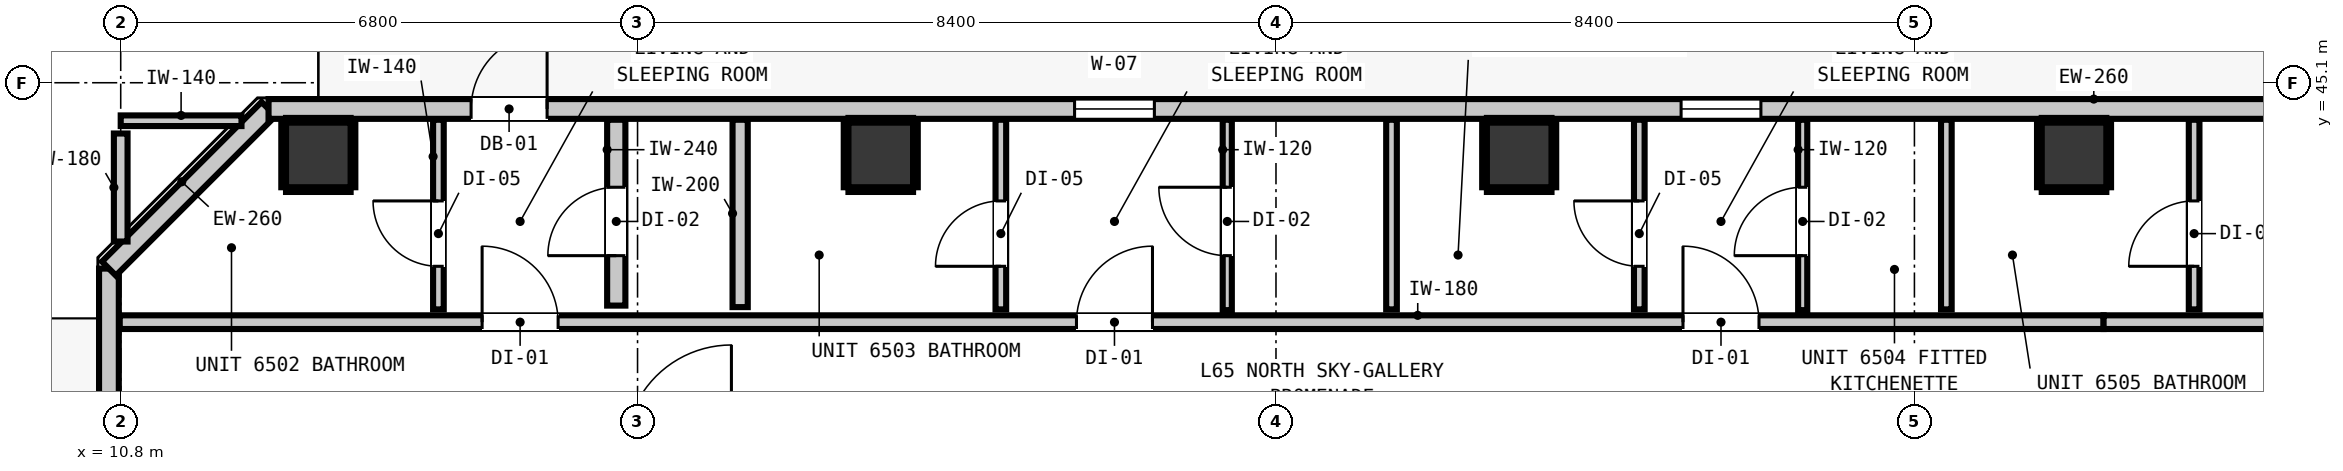
"""IFC4 building model, lengths in metres.
Left out: names, types, materials, properties, quantities, classifications, styles, units other than length and angle.
Written with IfcOpenShell. Run it as: python <this file> out.ifc"""

import sys

from ifc_helpers import new_model, si_unit, direction, frame, frame_2d, origin, origin_2d, place, context, subcontext, project, spatial, rectangle, extrude, element, fill, save


model = new_model("IFC4")
c1 = context("Model", 3, precision=1e-05, world=origin(), true_north=direction((0.0, 1.0)))
c2 = subcontext(c1, "Body", "Model", "MODEL_VIEW")
j1 = project(units=[si_unit("LENGTHUNIT", "METRE"), si_unit("PLANEANGLEUNIT", "RADIAN")], contexts=[c1])
p1 = place(None, origin())
s1 = spatial("IfcSite", under=j1, at=p1, CompositionType="ELEMENT")
p2 = place(p1, origin())
s2 = spatial("IfcBuilding", under=s1, at=p2, CompositionType="ELEMENT")
p3 = place(p2, frame((0.0, 0.0, 223.36)))
s3 = spatial("IfcBuildingStorey", under=s2, at=p3, CompositionType="ELEMENT", Elevation=223.36)
for number, where, z_axis, x_axis in (
    (1, (13.4, 44.15, 0.0), (0.0, 0.0, 1.0), (1.0, 0.0, 0.0)),
    (2, (20.8, 44.15, 0.0), (0.0, 0.0, 1.0), (1.0, 0.0, 0.0)),
    (3, (29.2, 44.15, 0.0), (0.0, 0.0, 1.0), (1.0, 0.0, 0.0)),
    (4, (36.5, 44.15, 0.0), (0.0, 0.0, 1.0), (1.0, 0.0, 0.0)),
):
    element("IfcColumn", number, at=place(p3, frame(where, z_axis=z_axis, x_axis=x_axis)), inside=s3, PredefinedType="COLUMN", context=c2, shape_type="SweptSolid", body=[
        extrude(rectangle(XDim=0.85, YDim=0.85, at=origin_2d()), origin(), (0.0, 0.0, 1.0), 3.32),
    ])
p4 = place(p3, frame((10.645, 12.345, 0.0), z_axis=(0.0, 0.0, 1.0), x_axis=(0.0, 1.0, 0.0)))
e5 = element("IfcWall", 5, at=p4, inside=s3, PredefinedType="STANDARD", context=c2, shape_type="SweptSolid", body=[
    extrude(rectangle(XDim=30.31, YDim=0.26, at=frame_2d((15.155, 0.0))), origin(), (0.0, 0.0, 1.0), 2.92),
])
p5 = place(p4, frame((0.91, 0.0, 0.0)))
e6 = element("IfcOpeningElement", 6, at=p5, cuts=e5, PredefinedType="OPENING", context=c2, shape_type="SweptSolid", body=[
    extrude(rectangle(XDim=1.0, YDim=2.15, at=frame_2d((0.5, 1.075))), frame((0.0, 0.14, 0.0), z_axis=(0.0, -1.0, 0.0), x_axis=(1.0, 0.0, 0.0)), (0.0, 0.0, 1.0), 0.28),
])
p6 = place(p4, frame((2.322, 0.0, 0.85)))
e7 = element("IfcOpeningElement", 7, at=p6, cuts=e5, PredefinedType="OPENING", context=c2, shape_type="SweptSolid", body=[
    extrude(rectangle(XDim=0.58, YDim=1.5, at=frame_2d((0.29, 0.75))), frame((0.0, 0.14, 0.0), z_axis=(0.0, -1.0, 0.0), x_axis=(1.0, 0.0, 0.0)), (0.0, 0.0, 1.0), 0.28),
])
p7 = place(p3, frame((10.645, 42.655, 0.0), z_axis=(0.0, 0.0, 1.0), x_axis=(0.707147883682, 0.707065676302, 0.0)))
e8 = element("IfcWall", 8, at=p7, inside=s3, PredefinedType="STANDARD", context=c2, shape_type="SweptSolid", body=[
    extrude(rectangle(XDim=2.97, YDim=0.26, at=frame_2d((1.485, 0.0))), origin(), (0.0, 0.0, 1.0), 2.92),
])
p8 = place(p3, frame((12.745, 44.755, 0.0), z_axis=(0.0, 0.0, 1.0), x_axis=(1.0, 0.0, 0.0)))
e9 = element("IfcWall", 9, at=p8, inside=s3, PredefinedType="STANDARD", context=c2, shape_type="SweptSolid", body=[
    extrude(rectangle(XDim=32.71, YDim=0.26, at=frame_2d((16.355, 0.0))), origin(), (0.0, 0.0, 1.0), 2.92),
])
p9 = place(p8, frame((2.665, 0.0, 0.0)))
e10 = element("IfcOpeningElement", 10, at=p9, cuts=e9, PredefinedType="OPENING", context=c2, shape_type="SweptSolid", body=[
    extrude(rectangle(XDim=1.0, YDim=2.15, at=frame_2d((0.5, 1.075))), frame((0.0, 0.14, 0.0), z_axis=(0.0, -1.0, 0.0), x_axis=(1.0, 0.0, 0.0)), (0.0, 0.0, 1.0), 0.28),
])
p10 = place(p8, frame((10.605, 0.0, 0.85)))
e11 = element("IfcOpeningElement", 11, at=p10, cuts=e9, PredefinedType="OPENING", context=c2, shape_type="SweptSolid", body=[
    extrude(rectangle(XDim=1.05, YDim=1.65, at=frame_2d((0.525, 0.825))), frame((0.0, 0.14, 0.0), z_axis=(0.0, -1.0, 0.0), x_axis=(1.0, 0.0, 0.0)), (0.0, 0.0, 1.0), 0.28),
])
p11 = place(p8, frame((18.585, 0.0, 0.85)))
e12 = element("IfcOpeningElement", 12, at=p11, cuts=e9, PredefinedType="OPENING", context=c2, shape_type="SweptSolid", body=[
    extrude(rectangle(XDim=1.05, YDim=1.65, at=frame_2d((0.525, 0.825))), frame((0.0, 0.14, 0.0), z_axis=(0.0, -1.0, 0.0), x_axis=(1.0, 0.0, 0.0)), (0.0, 0.0, 1.0), 0.28),
])
p12 = place(p8, frame((28.395, 0.0, 0.85)))
e13 = element("IfcOpeningElement", 13, at=p12, cuts=e9, PredefinedType="OPENING", context=c2, shape_type="SweptSolid", body=[
    extrude(rectangle(XDim=1.05, YDim=1.65, at=frame_2d((0.525, 0.825))), frame((0.0, 0.14, 0.0), z_axis=(0.0, -1.0, 0.0), x_axis=(1.0, 0.0, 0.0)), (0.0, 0.0, 1.0), 0.28),
])
p13 = place(p3, frame((10.787, 41.95, 0.0), z_axis=(0.0, 0.0, 1.0), x_axis=(1.0, 0.0, 0.0)))
e14 = element("IfcWall", 14, at=p13, inside=s3, PredefinedType="PARTITIONING", context=c2, shape_type="SweptSolid", body=[
    extrude(rectangle(XDim=26.102, YDim=0.18, at=frame_2d((13.051, 0.0))), origin(), (0.0, 0.0, 1.0), 2.92),
])
p14 = place(p13, frame((4.768, 0.0, 0.0)))
e15 = element("IfcOpeningElement", 15, at=p14, cuts=e14, PredefinedType="OPENING", context=c2, shape_type="SweptSolid", body=[
    extrude(rectangle(XDim=1.0, YDim=2.15, at=frame_2d((0.5, 1.075))), frame((0.0, 0.1, 0.0), z_axis=(0.0, -1.0, 0.0), x_axis=(1.0, 0.0, 0.0)), (0.0, 0.0, 1.0), 0.2),
])
p15 = place(p13, frame((12.588, 0.0, 0.0)))
e16 = element("IfcOpeningElement", 16, at=p15, cuts=e14, PredefinedType="OPENING", context=c2, shape_type="SweptSolid", body=[
    extrude(rectangle(XDim=1.0, YDim=2.15, at=frame_2d((0.5, 1.075))), frame((0.0, 0.1, 0.0), z_axis=(0.0, -1.0, 0.0), x_axis=(1.0, 0.0, 0.0)), (0.0, 0.0, 1.0), 0.2),
])
p16 = place(p13, frame((20.568, 0.0, 0.0)))
e17 = element("IfcOpeningElement", 17, at=p16, cuts=e14, PredefinedType="OPENING", context=c2, shape_type="SweptSolid", body=[
    extrude(rectangle(XDim=1.0, YDim=2.15, at=frame_2d((0.5, 1.075))), frame((0.0, 0.1, 0.0), z_axis=(0.0, -1.0, 0.0), x_axis=(1.0, 0.0, 0.0)), (0.0, 0.0, 1.0), 0.2),
])
p17 = place(p3, frame((36.889, 41.95, 0.0), z_axis=(0.0, 0.0, 1.0), x_axis=(1.0, 0.0, 0.0)))
e18 = element("IfcWall", 18, at=p17, inside=s3, PredefinedType="PARTITIONING", context=c2, shape_type="SweptSolid", body=[
    extrude(rectangle(XDim=9.722, YDim=0.18, at=frame_2d((4.861, 0.0))), origin(), (0.0, 0.0, 1.0), 2.297),
])
p18 = place(p17, frame((4.276, 0.0, 0.0)))
e19 = element("IfcOpeningElement", 19, at=p18, cuts=e18, PredefinedType="OPENING", context=c2, shape_type="SweptSolid", body=[
    extrude(rectangle(XDim=1.0, YDim=2.15, at=frame_2d((0.5, 1.075))), frame((0.0, 0.1, 0.0), z_axis=(0.0, -1.0, 0.0), x_axis=(1.0, 0.0, 0.0)), (0.0, 0.0, 1.0), 0.2),
])
p19 = place(p3, frame((10.8, 44.6, 0.0), z_axis=(0.0, 0.0, 1.0), x_axis=(1.0, 0.0, 0.0)))
e20 = element("IfcWall", 20, at=p19, inside=s3, PredefinedType="PARTITIONING", context=c2, shape_type="SweptSolid", body=[
    extrude(rectangle(XDim=1.589, YDim=0.14, at=frame_2d((0.794, 0.0))), origin(), (0.0, 0.0, 1.0), 2.92),
])
p20 = place(p3, frame((17.32, 42.168, 0.0), z_axis=(0.0, 0.0, 1.0), x_axis=(0.0, 1.0, 0.0)))
e21 = element("IfcWall", 21, at=p20, inside=s3, PredefinedType="PARTITIONING", context=c2, shape_type="SweptSolid", body=[
    extrude(rectangle(XDim=2.445, YDim=0.24, at=frame_2d((1.223, 0.0))), origin(), (0.0, 0.0, 1.0), 2.92),
])
p21 = place(p20, frame((0.657, 0.0, 0.0)))
e22 = element("IfcOpeningElement", 22, at=p21, cuts=e21, PredefinedType="OPENING", context=c2, shape_type="SweptSolid", body=[
    extrude(rectangle(XDim=0.9, YDim=2.1, at=frame_2d((0.45, 1.05))), frame((0.0, 0.13, 0.0), z_axis=(0.0, -1.0, 0.0), x_axis=(1.0, 0.0, 0.0)), (0.0, 0.0, 1.0), 0.26),
])
p22 = place(p3, frame((18.95, 42.148, 0.0), z_axis=(0.0, 0.0, 1.0), x_axis=(0.0, 1.0, 0.0)))
e23 = element("IfcWall", 23, at=p22, inside=s3, PredefinedType="PARTITIONING", context=c2, shape_type="SweptSolid", body=[
    extrude(rectangle(XDim=2.465, YDim=0.2, at=frame_2d((1.232, 0.0))), origin(), (0.0, 0.0, 1.0), 2.92),
])
p23 = place(p3, frame((10.8, 43.011, 0.0), z_axis=(0.0, 0.0, 1.0), x_axis=(0.0, 1.0, 0.0)))
e24 = element("IfcWall", 24, at=p23, inside=s3, PredefinedType="PARTITIONING", context=c2, shape_type="SweptSolid", body=[
    extrude(rectangle(XDim=1.421, YDim=0.18, at=frame_2d((0.71, 0.0))), origin(), (0.0, 0.0, 1.0), 2.92),
])
p24 = place(p3, frame((14.98, 42.118, 0.0), z_axis=(0.0, 0.0, 1.0), x_axis=(0.0, 1.0, 0.0)))
e25 = element("IfcWall", 25, at=p24, inside=s3, PredefinedType="PARTITIONING", context=c2, shape_type="SweptSolid", body=[
    extrude(rectangle(XDim=2.495, YDim=0.14, at=frame_2d((1.248, 0.0))), origin(), (0.0, 0.0, 1.0), 2.92),
])
p25 = place(p24, frame((0.567, 0.0, 0.0)))
e26 = element("IfcOpeningElement", 26, at=p25, cuts=e25, PredefinedType="OPENING", context=c2, shape_type="SweptSolid", body=[
    extrude(rectangle(XDim=0.86, YDim=2.02, at=frame_2d((0.43, 1.01))), frame((0.0, 0.08, 0.0), z_axis=(0.0, -1.0, 0.0), x_axis=(1.0, 0.0, 0.0)), (0.0, 0.0, 1.0), 0.16),
])
p26 = place(p3, frame((22.38, 42.118, 0.0), z_axis=(0.0, 0.0, 1.0), x_axis=(0.0, 1.0, 0.0)))
e27 = element("IfcWall", 27, at=p26, inside=s3, PredefinedType="PARTITIONING", context=c2, shape_type="SweptSolid", body=[
    extrude(rectangle(XDim=2.495, YDim=0.14, at=frame_2d((1.248, 0.0))), origin(), (0.0, 0.0, 1.0), 2.92),
])
p27 = place(p26, frame((0.567, 0.0, 0.0)))
e28 = element("IfcOpeningElement", 28, at=p27, cuts=e27, PredefinedType="OPENING", context=c2, shape_type="SweptSolid", body=[
    extrude(rectangle(XDim=0.86, YDim=2.02, at=frame_2d((0.43, 1.01))), frame((0.0, 0.08, 0.0), z_axis=(0.0, -1.0, 0.0), x_axis=(1.0, 0.0, 0.0)), (0.0, 0.0, 1.0), 0.16),
])
p28 = place(p3, frame((27.52, 42.118, 0.0), z_axis=(0.0, 0.0, 1.0), x_axis=(0.0, 1.0, 0.0)))
e29 = element("IfcWall", 29, at=p28, inside=s3, PredefinedType="PARTITIONING", context=c2, shape_type="SweptSolid", body=[
    extrude(rectangle(XDim=2.495, YDim=0.14, at=frame_2d((1.248, 0.0))), origin(), (0.0, 0.0, 1.0), 2.92),
])
p29 = place(p3, frame((30.78, 42.118, 0.0), z_axis=(0.0, 0.0, 1.0), x_axis=(0.0, 1.0, 0.0)))
e30 = element("IfcWall", 30, at=p29, inside=s3, PredefinedType="PARTITIONING", context=c2, shape_type="SweptSolid", body=[
    extrude(rectangle(XDim=2.495, YDim=0.14, at=frame_2d((1.248, 0.0))), origin(), (0.0, 0.0, 1.0), 2.92),
])
p30 = place(p29, frame((0.567, 0.0, 0.0)))
e31 = element("IfcOpeningElement", 31, at=p30, cuts=e30, PredefinedType="OPENING", context=c2, shape_type="SweptSolid", body=[
    extrude(rectangle(XDim=0.86, YDim=2.02, at=frame_2d((0.43, 1.01))), frame((0.0, 0.08, 0.0), z_axis=(0.0, -1.0, 0.0), x_axis=(1.0, 0.0, 0.0)), (0.0, 0.0, 1.0), 0.16),
])
p31 = place(p3, frame((34.82, 42.118, 0.0), z_axis=(0.0, 0.0, 1.0), x_axis=(0.0, 1.0, 0.0)))
e32 = element("IfcWall", 32, at=p31, inside=s3, PredefinedType="PARTITIONING", context=c2, shape_type="SweptSolid", body=[
    extrude(rectangle(XDim=2.495, YDim=0.14, at=frame_2d((1.248, 0.0))), origin(), (0.0, 0.0, 1.0), 2.92),
])
p32 = place(p3, frame((38.08, 42.118, 0.0), z_axis=(0.0, 0.0, 1.0), x_axis=(0.0, 1.0, 0.0)))
e33 = element("IfcWall", 33, at=p32, inside=s3, PredefinedType="PARTITIONING", context=c2, shape_type="SweptSolid", body=[
    extrude(rectangle(XDim=2.495, YDim=0.14, at=frame_2d((1.248, 0.0))), origin(), (0.0, 0.0, 1.0), 2.92),
])
p33 = place(p32, frame((0.567, 0.0, 0.0)))
e34 = element("IfcOpeningElement", 34, at=p33, cuts=e33, PredefinedType="OPENING", context=c2, shape_type="SweptSolid", body=[
    extrude(rectangle(XDim=0.86, YDim=2.02, at=frame_2d((0.43, 1.01))), frame((0.0, 0.08, 0.0), z_axis=(0.0, -1.0, 0.0), x_axis=(1.0, 0.0, 0.0)), (0.0, 0.0, 1.0), 0.16),
])
p34 = place(p3, frame((25.359, 42.108, 0.0), z_axis=(0.0, 0.0, 1.0), x_axis=(0.0, 1.0, 0.0)))
e35 = element("IfcWall", 35, at=p34, inside=s3, PredefinedType="PARTITIONING", context=c2, shape_type="SweptSolid", body=[
    extrude(rectangle(XDim=2.505, YDim=0.12, at=frame_2d((1.252, 0.0))), origin(), (0.0, 0.0, 1.0), 2.92),
])
p35 = place(p34, frame((0.717, 0.0, 0.0)))
e36 = element("IfcOpeningElement", 36, at=p35, cuts=e35, PredefinedType="OPENING", context=c2, shape_type="SweptSolid", body=[
    extrude(rectangle(XDim=0.9, YDim=2.1, at=frame_2d((0.45, 1.05))), frame((0.0, 0.07, 0.0), z_axis=(0.0, -1.0, 0.0), x_axis=(1.0, 0.0, 0.0)), (0.0, 0.0, 1.0), 0.14),
])
p36 = place(p3, frame((32.93, 42.108, 0.0), z_axis=(0.0, 0.0, 1.0), x_axis=(0.0, 1.0, 0.0)))
e37 = element("IfcWall", 37, at=p36, inside=s3, PredefinedType="PARTITIONING", context=c2, shape_type="SweptSolid", body=[
    extrude(rectangle(XDim=2.505, YDim=0.12, at=frame_2d((1.252, 0.0))), origin(), (0.0, 0.0, 1.0), 2.92),
])
p37 = place(p36, frame((0.717, 0.0, 0.0)))
e38 = element("IfcOpeningElement", 38, at=p37, cuts=e37, PredefinedType="OPENING", context=c2, shape_type="SweptSolid", body=[
    extrude(rectangle(XDim=0.9, YDim=2.1, at=frame_2d((0.45, 1.05))), frame((0.0, 0.07, 0.0), z_axis=(0.0, -1.0, 0.0), x_axis=(1.0, 0.0, 0.0)), (0.0, 0.0, 1.0), 0.14),
])
for number, where, z_axis, x_axis in (
    (39, (12.975, 43.693, 0.0), (0.0, 0.0, 1.0), (1.0, 0.0, 0.0)),
    (40, (12.975, 44.607, 0.0), (0.0, 0.0, 1.0), (1.0, 0.0, 0.0)),
    (41, (12.943, 43.725, 0.0), (0.0, 0.0, 1.0), (0.0, 1.0, 0.0)),
    (42, (13.857, 43.725, 0.0), (0.0, 0.0, 1.0), (0.0, 1.0, 0.0)),
):
    element("IfcWall", number, at=place(p3, frame(where, z_axis=z_axis, x_axis=x_axis)), inside=s3, PredefinedType="PARTITIONING", context=c2, shape_type="SweptSolid", body=[
        extrude(rectangle(XDim=0.85, YDim=0.06, at=frame_2d((0.425, 0.0))), origin(), (0.0, 0.0, 1.0), 1.45),
    ])
for number, where, z_axis, x_axis in (
    (43, (20.375, 43.693, 0.0), (0.0, 0.0, 1.0), (1.0, 0.0, 0.0)),
    (44, (20.375, 44.607, 0.0), (0.0, 0.0, 1.0), (1.0, 0.0, 0.0)),
):
    element("IfcWall", number, at=place(p3, frame(where, z_axis=z_axis, x_axis=x_axis)), inside=s3, PredefinedType="PARTITIONING", context=c2, shape_type="SweptSolid", body=[
        extrude(rectangle(XDim=0.85, YDim=0.06, at=frame_2d((0.425, 0.0))), origin(), (0.0, 0.0, 1.0), 1.45),
    ])
for number, where, z_axis, x_axis in (
    (45, (20.343, 43.725, 0.0), (0.0, 0.0, 1.0), (0.0, 1.0, 0.0)),
    (46, (21.257, 43.725, 0.0), (0.0, 0.0, 1.0), (0.0, 1.0, 0.0)),
):
    element("IfcWall", number, at=place(p3, frame(where, z_axis=z_axis, x_axis=x_axis)), inside=s3, PredefinedType="PARTITIONING", context=c2, shape_type="SweptSolid", body=[
        extrude(rectangle(XDim=0.85, YDim=0.06, at=frame_2d((0.425, 0.0))), origin(), (0.0, 0.0, 1.0), 1.45),
    ])
for number, where, z_axis, x_axis in (
    (47, (28.775, 43.693, 0.0), (0.0, 0.0, 1.0), (1.0, 0.0, 0.0)),
    (48, (28.775, 44.607, 0.0), (0.0, 0.0, 1.0), (1.0, 0.0, 0.0)),
):
    element("IfcWall", number, at=place(p3, frame(where, z_axis=z_axis, x_axis=x_axis)), inside=s3, PredefinedType="PARTITIONING", context=c2, shape_type="SweptSolid", body=[
        extrude(rectangle(XDim=0.85, YDim=0.06, at=frame_2d((0.425, 0.0))), origin(), (0.0, 0.0, 1.0), 1.45),
    ])
for number, where, z_axis, x_axis in (
    (49, (28.743, 43.725, 0.0), (0.0, 0.0, 1.0), (0.0, 1.0, 0.0)),
    (50, (29.657, 43.725, 0.0), (0.0, 0.0, 1.0), (0.0, 1.0, 0.0)),
):
    element("IfcWall", number, at=place(p3, frame(where, z_axis=z_axis, x_axis=x_axis)), inside=s3, PredefinedType="PARTITIONING", context=c2, shape_type="SweptSolid", body=[
        extrude(rectangle(XDim=0.85, YDim=0.06, at=frame_2d((0.425, 0.0))), origin(), (0.0, 0.0, 1.0), 1.45),
    ])
for number, where, z_axis, x_axis in (
    (51, (36.075, 43.693, 0.0), (0.0, 0.0, 1.0), (1.0, 0.0, 0.0)),
    (52, (36.075, 44.607, 0.0), (0.0, 0.0, 1.0), (1.0, 0.0, 0.0)),
):
    element("IfcWall", number, at=place(p3, frame(where, z_axis=z_axis, x_axis=x_axis)), inside=s3, PredefinedType="PARTITIONING", context=c2, shape_type="SweptSolid", body=[
        extrude(rectangle(XDim=0.85, YDim=0.06, at=frame_2d((0.425, 0.0))), origin(), (0.0, 0.0, 1.0), 1.45),
    ])
for number, where, z_axis, x_axis in (
    (53, (36.043, 43.725, 0.0), (0.0, 0.0, 1.0), (0.0, 1.0, 0.0)),
    (54, (36.957, 43.725, 0.0), (0.0, 0.0, 1.0), (0.0, 1.0, 0.0)),
):
    element("IfcWall", number, at=place(p3, frame(where, z_axis=z_axis, x_axis=x_axis)), inside=s3, PredefinedType="PARTITIONING", context=c2, shape_type="SweptSolid", body=[
        extrude(rectangle(XDim=0.85, YDim=0.06, at=frame_2d((0.425, 0.0))), origin(), (0.0, 0.0, 1.0), 1.45),
    ])
p38 = place(p9, origin())
e55 = element("IfcDoor", 55, at=p38, inside=s3, OperationType="SINGLE_SWING_RIGHT", PredefinedType="DOOR", context=c2, shape_type="SweptSolid", body=[
    extrude(rectangle(XDim=1.0, YDim=2.15, at=frame_2d((0.5, 1.075))), frame((0.0, 0.025, 0.0), z_axis=(0.0, -1.0, 0.0), x_axis=(1.0, 0.0, 0.0)), (0.0, 0.0, 1.0), 0.05),
])
fill(e10, e55)
p39 = place(p10, origin())
e56 = element("IfcWindow", 56, at=p39, inside=s3, PartitioningType="SINGLE_PANEL", PredefinedType="WINDOW", context=c2, shape_type="SweptSolid", body=[
    extrude(rectangle(XDim=1.05, YDim=1.65, at=frame_2d((0.525, 0.825))), frame((0.0, 0.03, 0.0), z_axis=(0.0, -1.0, 0.0), x_axis=(1.0, 0.0, 0.0)), (0.0, 0.0, 1.0), 0.06),
])
fill(e11, e56)
p40 = place(p11, origin())
e57 = element("IfcWindow", 57, at=p40, inside=s3, PartitioningType="SINGLE_PANEL", PredefinedType="WINDOW", context=c2, shape_type="SweptSolid", body=[
    extrude(rectangle(XDim=1.05, YDim=1.65, at=frame_2d((0.525, 0.825))), frame((0.0, 0.03, 0.0), z_axis=(0.0, -1.0, 0.0), x_axis=(1.0, 0.0, 0.0)), (0.0, 0.0, 1.0), 0.06),
])
fill(e12, e57)
p41 = place(p14, origin())
e58 = element("IfcDoor", 58, at=p41, inside=s3, OperationType="SINGLE_SWING_LEFT", PredefinedType="DOOR", context=c2, shape_type="SweptSolid", body=[
    extrude(rectangle(XDim=1.0, YDim=2.15, at=frame_2d((0.5, 1.075))), frame((0.0, 0.025, 0.0), z_axis=(0.0, -1.0, 0.0), x_axis=(1.0, 0.0, 0.0)), (0.0, 0.0, 1.0), 0.05),
])
fill(e15, e58)
p42 = place(p25, origin())
e59 = element("IfcDoor", 59, at=p42, inside=s3, OperationType="SINGLE_SWING_RIGHT", PredefinedType="DOOR", context=c2, shape_type="SweptSolid", body=[
    extrude(rectangle(XDim=0.86, YDim=2.02, at=frame_2d((0.43, 1.01))), frame((0.0, 0.025, 0.0), z_axis=(0.0, -1.0, 0.0), x_axis=(1.0, 0.0, 0.0)), (0.0, 0.0, 1.0), 0.05),
])
fill(e26, e59)
p43 = place(p21, origin())
e60 = element("IfcDoor", 60, at=p43, inside=s3, OperationType="SINGLE_SWING_LEFT", PredefinedType="DOOR", context=c2, shape_type="SweptSolid", body=[
    extrude(rectangle(XDim=0.9, YDim=2.1, at=frame_2d((0.45, 1.05))), frame((0.0, 0.025, 0.0), z_axis=(0.0, -1.0, 0.0), x_axis=(1.0, 0.0, 0.0)), (0.0, 0.0, 1.0), 0.05),
])
fill(e22, e60)
p44 = place(p15, origin())
e61 = element("IfcDoor", 61, at=p44, inside=s3, OperationType="SINGLE_SWING_RIGHT", PredefinedType="DOOR", context=c2, shape_type="SweptSolid", body=[
    extrude(rectangle(XDim=1.0, YDim=2.15, at=frame_2d((0.5, 1.075))), frame((0.0, 0.025, 0.0), z_axis=(0.0, -1.0, 0.0), x_axis=(1.0, 0.0, 0.0)), (0.0, 0.0, 1.0), 0.05),
])
fill(e16, e61)
p45 = place(p27, origin())
e62 = element("IfcDoor", 62, at=p45, inside=s3, OperationType="SINGLE_SWING_LEFT", PredefinedType="DOOR", context=c2, shape_type="SweptSolid", body=[
    extrude(rectangle(XDim=0.86, YDim=2.02, at=frame_2d((0.43, 1.01))), frame((0.0, 0.025, 0.0), z_axis=(0.0, -1.0, 0.0), x_axis=(1.0, 0.0, 0.0)), (0.0, 0.0, 1.0), 0.05),
])
fill(e28, e62)
p46 = place(p35, origin())
e63 = element("IfcDoor", 63, at=p46, inside=s3, OperationType="SINGLE_SWING_RIGHT", PredefinedType="DOOR", context=c2, shape_type="SweptSolid", body=[
    extrude(rectangle(XDim=0.9, YDim=2.1, at=frame_2d((0.45, 1.05))), frame((0.0, 0.025, 0.0), z_axis=(0.0, -1.0, 0.0), x_axis=(1.0, 0.0, 0.0)), (0.0, 0.0, 1.0), 0.05),
])
fill(e36, e63)
p47 = place(p16, origin())
e64 = element("IfcDoor", 64, at=p47, inside=s3, OperationType="SINGLE_SWING_LEFT", PredefinedType="DOOR", context=c2, shape_type="SweptSolid", body=[
    extrude(rectangle(XDim=1.0, YDim=2.15, at=frame_2d((0.5, 1.075))), frame((0.0, 0.025, 0.0), z_axis=(0.0, -1.0, 0.0), x_axis=(1.0, 0.0, 0.0)), (0.0, 0.0, 1.0), 0.05),
])
fill(e17, e64)
p48 = place(p30, origin())
e65 = element("IfcDoor", 65, at=p48, inside=s3, OperationType="SINGLE_SWING_RIGHT", PredefinedType="DOOR", context=c2, shape_type="SweptSolid", body=[
    extrude(rectangle(XDim=0.86, YDim=2.02, at=frame_2d((0.43, 1.01))), frame((0.0, 0.025, 0.0), z_axis=(0.0, -1.0, 0.0), x_axis=(1.0, 0.0, 0.0)), (0.0, 0.0, 1.0), 0.05),
])
fill(e31, e65)
p49 = place(p37, origin())
e66 = element("IfcDoor", 66, at=p49, inside=s3, OperationType="SINGLE_SWING_LEFT", PredefinedType="DOOR", context=c2, shape_type="SweptSolid", body=[
    extrude(rectangle(XDim=0.9, YDim=2.1, at=frame_2d((0.45, 1.05))), frame((0.0, 0.025, 0.0), z_axis=(0.0, -1.0, 0.0), x_axis=(1.0, 0.0, 0.0)), (0.0, 0.0, 1.0), 0.05),
])
fill(e38, e66)
p50 = place(p33, origin())
e67 = element("IfcDoor", 67, at=p50, inside=s3, OperationType="SINGLE_SWING_LEFT", PredefinedType="DOOR", context=c2, shape_type="SweptSolid", body=[
    extrude(rectangle(XDim=0.86, YDim=2.02, at=frame_2d((0.43, 1.01))), frame((0.0, 0.025, 0.0), z_axis=(0.0, -1.0, 0.0), x_axis=(1.0, 0.0, 0.0)), (0.0, 0.0, 1.0), 0.05),
])
fill(e34, e67)
save(model, sys.argv[1])
